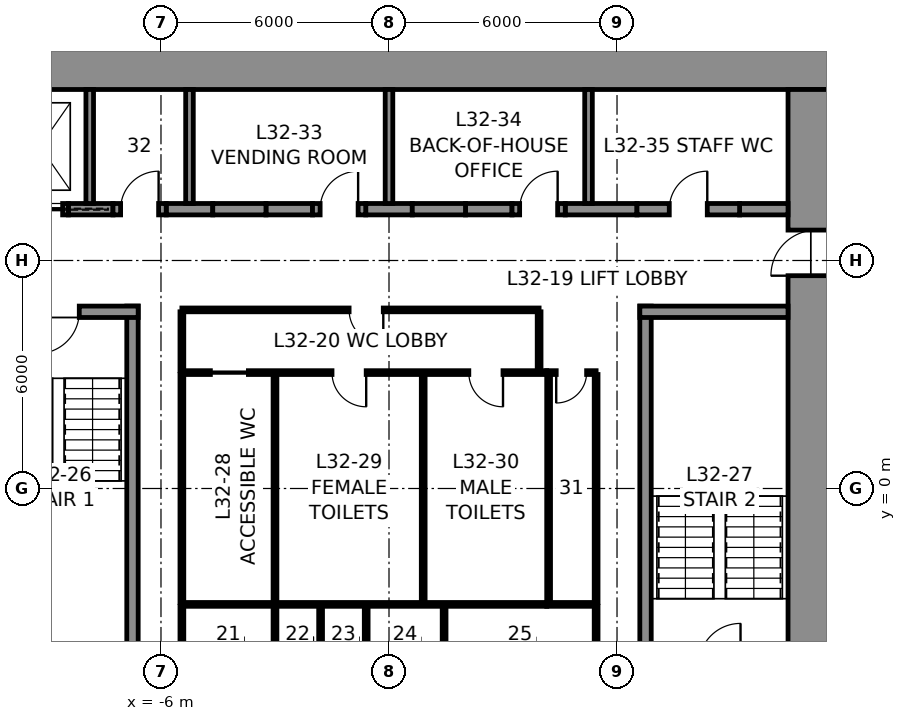
"""IFC4 building model, lengths in metres.
Left out: names, types, materials, properties, quantities, classifications, styles, units other than length and angle.
Written with IfcOpenShell. Run it as: python <this file> out.ifc"""

import sys

from ifc_helpers import new_model, si_unit, direction, frame, frame_2d, origin, place, context, subcontext, project, spatial, rectangle, extrude, element, fill, save


model = new_model("IFC4")
c1 = context("Model", 3, precision=1e-05, world=origin(), true_north=direction((0.0, 1.0)))
c2 = subcontext(c1, "Body", "Model", "MODEL_VIEW")
j1 = project(units=[si_unit("LENGTHUNIT", "METRE"), si_unit("PLANEANGLEUNIT", "RADIAN")], contexts=[c1])
p1 = place(None, origin())
s1 = spatial("IfcSite", under=j1, at=p1, CompositionType="ELEMENT")
p2 = place(p1, origin())
s2 = spatial("IfcBuilding", under=s1, at=p2, CompositionType="ELEMENT")
p3 = place(p2, frame((0.0, 0.0, 155.8)))
s3 = spatial("IfcBuildingStorey", under=s2, at=p3, CompositionType="ELEMENT", Elevation=155.8)
p4 = place(p3, frame((-12.0, 11.25, 0.0), z_axis=(0.0, 0.0, 1.0), x_axis=(1.0, 0.0, 0.0)))
e1 = element("IfcWall", 1, at=p4, inside=s3, PredefinedType="SHEAR", context=c2, shape_type="SweptSolid", body=[
    extrude(rectangle(XDim=24.0, YDim=1.5, at=frame_2d((12.0, 0.0))), origin(), (0.0, 0.0, 1.0), 4.0),
])
p5 = place(p3, frame((11.25, 10.5, 0.0), z_axis=(0.0, 0.0, 1.0), x_axis=(0.0, -1.0, 0.0)))
e2 = element("IfcWall", 2, at=p5, inside=s3, PredefinedType="SHEAR", context=c2, shape_type="SweptSolid", body=[
    extrude(rectangle(XDim=21.0, YDim=1.5, at=frame_2d((10.5, 0.0))), origin(), (0.0, 0.0, 1.0), 4.0),
])
p6 = place(p5, frame((3.7, 0.0, 0.0)))
e3 = element("IfcOpeningElement", 3, at=p6, cuts=e2, PredefinedType="OPENING", context=c2, shape_type="SweptSolid", body=[
    extrude(rectangle(XDim=1.2, YDim=2.3, at=frame_2d((0.6, 1.15))), frame((0.0, 0.76, 0.0), z_axis=(0.0, -1.0, 0.0), x_axis=(1.0, 0.0, 0.0)), (0.0, 0.0, 1.0), 1.52),
])
p7 = place(p5, frame((16.1, 0.0, 0.0)))
e4 = element("IfcOpeningElement", 4, at=p7, cuts=e2, PredefinedType="OPENING", context=c2, shape_type="SweptSolid", body=[
    extrude(rectangle(XDim=1.2, YDim=2.3, at=frame_2d((0.6, 1.15))), frame((0.0, 0.76, 0.0), z_axis=(0.0, -1.0, 0.0), x_axis=(1.0, 0.0, 0.0)), (0.0, 0.0, 1.0), 1.52),
])
p8 = place(p3, frame((-8.438, 7.35, 0.0), z_axis=(0.0, 0.0, 1.0), x_axis=(1.0, 0.0, 0.0)))
e5 = element("IfcWall", 5, at=p8, inside=s3, PredefinedType="SHEAR", context=c2, shape_type="SweptSolid", body=[
    extrude(rectangle(XDim=1.175, YDim=0.3, at=frame_2d((0.587, 0.0))), origin(), (0.0, 0.0, 1.0), 4.0),
])
for number, where, z_axis, x_axis in (
    (6, (-5.863, 7.35, 0.0), (0.0, 0.0, 1.0), (1.0, 0.0, 0.0)),
    (7, (-3.238, 7.35, 0.0), (0.0, 0.0, 1.0), (1.0, 0.0, 0.0)),
    (8, (-0.613, 7.35, 0.0), (0.0, 0.0, 1.0), (1.0, 0.0, 0.0)),
    (9, (2.012, 7.35, 0.0), (0.0, 0.0, 1.0), (1.0, 0.0, 0.0)),
):
    element("IfcWall", number, at=place(p3, frame(where, z_axis=z_axis, x_axis=x_axis)), inside=s3, PredefinedType="SHEAR", context=c2, shape_type="SweptSolid", body=[
        extrude(rectangle(XDim=1.225, YDim=0.3, at=frame_2d((0.613, 0.0))), origin(), (0.0, 0.0, 1.0), 4.0),
    ])
p9 = place(p3, frame((4.637, 7.35, 0.0), z_axis=(0.0, 0.0, 1.0), x_axis=(1.0, 0.0, 0.0)))
e10 = element("IfcWall", 10, at=p9, inside=s3, PredefinedType="SHEAR", context=c2, shape_type="SweptSolid", body=[
    extrude(rectangle(XDim=1.887, YDim=0.3, at=frame_2d((0.944, 0.0))), origin(), (0.0, 0.0, 1.0), 4.0),
])
p10 = place(p3, frame((9.225, 7.35, 0.0), z_axis=(0.0, 0.0, 1.0), x_axis=(1.0, 0.0, 0.0)))
e11 = element("IfcWall", 11, at=p10, inside=s3, PredefinedType="SHEAR", context=c2, shape_type="SweptSolid", body=[
    extrude(rectangle(XDim=1.275, YDim=0.3, at=frame_2d((0.637, 0.0))), origin(), (0.0, 0.0, 1.0), 4.0),
])
p11 = place(p3, frame((-9.938, 7.35, 0.0), z_axis=(0.0, 0.0, 1.0), x_axis=(1.0, 0.0, 0.0)))
e12 = element("IfcWall", 12, at=p11, inside=s3, PredefinedType="PARTITIONING", context=c2, shape_type="SweptSolid", body=[
    extrude(rectangle(XDim=1.5, YDim=0.3, at=frame_2d((0.75, 0.0))), origin(), (0.0, 0.0, 1.0), 4.0),
])
p12 = place(p11, frame((0.15, 0.0, 0.0)))
e13 = element("IfcOpeningElement", 13, at=p12, cuts=e12, PredefinedType="OPENING", context=c2, shape_type="SweptSolid", body=[
    extrude(rectangle(XDim=1.2, YDim=2.3, at=frame_2d((0.6, 1.15))), frame((0.0, 0.16, 0.0), z_axis=(0.0, -1.0, 0.0), x_axis=(1.0, 0.0, 0.0)), (0.0, 0.0, 1.0), 0.32),
])
p13 = place(p3, frame((-7.262, 7.35, 0.0), z_axis=(0.0, 0.0, 1.0), x_axis=(1.0, 0.0, 0.0)))
e14 = element("IfcWall", 14, at=p13, inside=s3, PredefinedType="PARTITIONING", context=c2, shape_type="SweptSolid", body=[
    extrude(rectangle(XDim=1.4, YDim=0.3, at=frame_2d((0.7, 0.0))), origin(), (0.0, 0.0, 1.0), 4.0),
])
p14 = place(p13, frame((0.2, 0.0, 0.0)))
e15 = element("IfcOpeningElement", 15, at=p14, cuts=e14, PredefinedType="OPENING", context=c2, shape_type="SweptSolid", body=[
    extrude(rectangle(XDim=1.0, YDim=2.3, at=frame_2d((0.5, 1.15))), frame((0.0, 0.16, 0.0), z_axis=(0.0, -1.0, 0.0), x_axis=(1.0, 0.0, 0.0)), (0.0, 0.0, 1.0), 0.32),
])
p15 = place(p3, frame((-4.637, 7.35, 0.0), z_axis=(0.0, 0.0, 1.0), x_axis=(1.0, 0.0, 0.0)))
e16 = element("IfcWall", 16, at=p15, inside=s3, PredefinedType="PARTITIONING", context=c2, shape_type="SweptSolid", body=[
    extrude(rectangle(XDim=1.4, YDim=0.3, at=frame_2d((0.7, 0.0))), origin(), (0.0, 0.0, 1.0), 4.0),
])
p16 = place(p3, frame((-2.012, 7.35, 0.0), z_axis=(0.0, 0.0, 1.0), x_axis=(1.0, 0.0, 0.0)))
e17 = element("IfcWall", 17, at=p16, inside=s3, PredefinedType="PARTITIONING", context=c2, shape_type="SweptSolid", body=[
    extrude(rectangle(XDim=1.4, YDim=0.3, at=frame_2d((0.7, 0.0))), origin(), (0.0, 0.0, 1.0), 4.0),
])
p17 = place(p16, frame((0.2, 0.0, 0.0)))
e18 = element("IfcOpeningElement", 18, at=p17, cuts=e17, PredefinedType="OPENING", context=c2, shape_type="SweptSolid", body=[
    extrude(rectangle(XDim=1.0, YDim=2.3, at=frame_2d((0.5, 1.15))), frame((0.0, 0.16, 0.0), z_axis=(0.0, -1.0, 0.0), x_axis=(1.0, 0.0, 0.0)), (0.0, 0.0, 1.0), 0.32),
])
p18 = place(p3, frame((0.613, 7.35, 0.0), z_axis=(0.0, 0.0, 1.0), x_axis=(1.0, 0.0, 0.0)))
e19 = element("IfcWall", 19, at=p18, inside=s3, PredefinedType="PARTITIONING", context=c2, shape_type="SweptSolid", body=[
    extrude(rectangle(XDim=1.4, YDim=0.3, at=frame_2d((0.7, 0.0))), origin(), (0.0, 0.0, 1.0), 4.0),
])
p19 = place(p3, frame((3.238, 7.35, 0.0), z_axis=(0.0, 0.0, 1.0), x_axis=(1.0, 0.0, 0.0)))
e20 = element("IfcWall", 20, at=p19, inside=s3, PredefinedType="PARTITIONING", context=c2, shape_type="SweptSolid", body=[
    extrude(rectangle(XDim=1.4, YDim=0.3, at=frame_2d((0.7, 0.0))), origin(), (0.0, 0.0, 1.0), 4.0),
])
p20 = place(p19, frame((0.2, 0.0, 0.0)))
e21 = element("IfcOpeningElement", 21, at=p20, cuts=e20, PredefinedType="OPENING", context=c2, shape_type="SweptSolid", body=[
    extrude(rectangle(XDim=1.0, YDim=2.3, at=frame_2d((0.5, 1.15))), frame((0.0, 0.16, 0.0), z_axis=(0.0, -1.0, 0.0), x_axis=(1.0, 0.0, 0.0)), (0.0, 0.0, 1.0), 0.32),
])
p21 = place(p3, frame((6.525, 7.35, 0.0), z_axis=(0.0, 0.0, 1.0), x_axis=(1.0, 0.0, 0.0)))
e22 = element("IfcWall", 22, at=p21, inside=s3, PredefinedType="PARTITIONING", context=c2, shape_type="SweptSolid", body=[
    extrude(rectangle(XDim=2.7, YDim=0.3, at=frame_2d((1.35, 0.0))), origin(), (0.0, 0.0, 1.0), 4.0),
])
p22 = place(p21, frame((0.85, 0.0, 0.0)))
e23 = element("IfcOpeningElement", 23, at=p22, cuts=e22, PredefinedType="OPENING", context=c2, shape_type="SweptSolid", body=[
    extrude(rectangle(XDim=1.0, YDim=2.3, at=frame_2d((0.5, 1.15))), frame((0.0, 0.16, 0.0), z_axis=(0.0, -1.0, 0.0), x_axis=(1.0, 0.0, 0.0)), (0.0, 0.0, 1.0), 0.32),
])
for number, where, z_axis, x_axis in (
    (24, (-7.875, 7.5, 0.0), (0.0, 0.0, 1.0), (0.0, 1.0, 0.0)),
    (25, (-5.25, 7.5, 0.0), (0.0, 0.0, 1.0), (0.0, 1.0, 0.0)),
    (26, (0.0, 7.5, 0.0), (0.0, 0.0, 1.0), (0.0, 1.0, 0.0)),
    (27, (5.25, 7.5, 0.0), (0.0, 0.0, 1.0), (0.0, 1.0, 0.0)),
):
    element("IfcWall", number, at=place(p3, frame(where, z_axis=z_axis, x_axis=x_axis)), inside=s3, PredefinedType="PARTITIONING", context=c2, shape_type="SweptSolid", body=[
        extrude(rectangle(XDim=3.0, YDim=0.2, at=frame_2d((1.5, 0.0))), origin(), (0.0, 0.0, 1.0), 4.0),
    ])
p23 = place(p3, frame((-6.75, -4.8, 0.0), z_axis=(0.0, 0.0, 1.0), x_axis=(0.0, 1.0, 0.0)))
e28 = element("IfcWall", 28, at=p23, inside=s3, PredefinedType="SOLIDWALL", context=c2, shape_type="SweptSolid", body=[
    extrude(rectangle(XDim=9.6, YDim=0.3, at=frame_2d((4.8, 0.0))), origin(), (0.0, 0.0, 1.0), 3.75),
])
p24 = place(p3, frame((-10.5, 4.65, 0.0), z_axis=(0.0, 0.0, 1.0), x_axis=(1.0, 0.0, 0.0)))
e29 = element("IfcWall", 29, at=p24, inside=s3, PredefinedType="SOLIDWALL", context=c2, shape_type="SweptSolid", body=[
    extrude(rectangle(XDim=3.9, YDim=0.3, at=frame_2d((1.95, 0.0))), origin(), (0.0, 0.0, 1.0), 3.75),
])
p25 = place(p24, frame((1.25, 0.0, 0.0)))
e30 = element("IfcOpeningElement", 30, at=p25, cuts=e29, PredefinedType="OPENING", context=c2, shape_type="SweptSolid", body=[
    extrude(rectangle(XDim=1.1, YDim=2.3, at=frame_2d((0.55, 1.15))), frame((0.0, 0.16, 0.0), z_axis=(0.0, -1.0, 0.0), x_axis=(1.0, 0.0, 0.0)), (0.0, 0.0, 1.0), 0.32),
])
p26 = place(p3, frame((6.75, -4.8, 0.0), z_axis=(0.0, 0.0, 1.0), x_axis=(0.0, 1.0, 0.0)))
e31 = element("IfcWall", 31, at=p26, inside=s3, PredefinedType="SOLIDWALL", context=c2, shape_type="SweptSolid", body=[
    extrude(rectangle(XDim=9.6, YDim=0.3, at=frame_2d((4.8, 0.0))), origin(), (0.0, 0.0, 1.0), 3.75),
])
p27 = place(p3, frame((6.6, 4.65, 0.0), z_axis=(0.0, 0.0, 1.0), x_axis=(1.0, 0.0, 0.0)))
e32 = element("IfcWall", 32, at=p27, inside=s3, PredefinedType="SOLIDWALL", context=c2, shape_type="SweptSolid", body=[
    extrude(rectangle(XDim=3.9, YDim=0.3, at=frame_2d((1.95, 0.0))), origin(), (0.0, 0.0, 1.0), 3.75),
])
p28 = place(p3, frame((-5.45, 3.05, 0.0), z_axis=(0.0, 0.0, 1.0), x_axis=(1.0, 0.0, 0.0)))
e33 = element("IfcWall", 33, at=p28, inside=s3, PredefinedType="PARTITIONING", context=c2, shape_type="SweptSolid", body=[
    extrude(rectangle(XDim=9.6, YDim=0.1, at=frame_2d((4.8, 0.0))), origin(), (0.0, 0.0, 1.0), 3.75),
])
p29 = place(p28, frame((0.75, 0.0, 0.0)))
e34 = element("IfcOpeningElement", 34, at=p29, cuts=e33, PredefinedType="OPENING", context=c2, shape_type="SweptSolid", body=[
    extrude(rectangle(XDim=1.0, YDim=2.3, at=frame_2d((0.5, 1.15))), frame((0.0, 0.06, 0.0), z_axis=(0.0, -1.0, 0.0), x_axis=(1.0, 0.0, 0.0)), (0.0, 0.0, 1.0), 0.12),
])
p30 = place(p28, frame((3.95, 0.0, 0.0)))
e35 = element("IfcOpeningElement", 35, at=p30, cuts=e33, PredefinedType="OPENING", context=c2, shape_type="SweptSolid", body=[
    extrude(rectangle(XDim=0.9, YDim=2.3, at=frame_2d((0.45, 1.15))), frame((0.0, 0.06, 0.0), z_axis=(0.0, -1.0, 0.0), x_axis=(1.0, 0.0, 0.0)), (0.0, 0.0, 1.0), 0.12),
])
p31 = place(p28, frame((7.55, 0.0, 0.0)))
e36 = element("IfcOpeningElement", 36, at=p31, cuts=e33, PredefinedType="OPENING", context=c2, shape_type="SweptSolid", body=[
    extrude(rectangle(XDim=0.9, YDim=2.3, at=frame_2d((0.45, 1.15))), frame((0.0, 0.06, 0.0), z_axis=(0.0, -1.0, 0.0), x_axis=(1.0, 0.0, 0.0)), (0.0, 0.0, 1.0), 0.12),
])
p32 = place(p3, frame((4.15, 3.05, 0.0), z_axis=(0.0, 0.0, 1.0), x_axis=(1.0, 0.0, 0.0)))
e37 = element("IfcWall", 37, at=p32, inside=s3, PredefinedType="PARTITIONING", context=c2, shape_type="SweptSolid", body=[
    extrude(rectangle(XDim=1.3, YDim=0.1, at=frame_2d((0.65, 0.0))), origin(), (0.0, 0.0, 1.0), 3.75),
])
p33 = place(p32, frame((0.25, 0.0, 0.0)))
e38 = element("IfcOpeningElement", 38, at=p33, cuts=e37, PredefinedType="OPENING", context=c2, shape_type="SweptSolid", body=[
    extrude(rectangle(XDim=0.8, YDim=2.3, at=frame_2d((0.4, 1.15))), frame((0.0, 0.06, 0.0), z_axis=(0.0, -1.0, 0.0), x_axis=(1.0, 0.0, 0.0)), (0.0, 0.0, 1.0), 0.12),
])
p34 = place(p3, frame((4.15, -3.05, 0.0), z_axis=(0.0, 0.0, 1.0), x_axis=(-1.0, 0.0, 0.0)))
e39 = element("IfcWall", 39, at=p34, inside=s3, PredefinedType="PARTITIONING", context=c2, shape_type="SweptSolid", body=[
    extrude(rectangle(XDim=9.6, YDim=0.1, at=frame_2d((4.8, 0.0))), origin(), (0.0, 0.0, 1.0), 3.75),
])
p35 = place(p3, frame((5.45, -3.05, 0.0), z_axis=(0.0, 0.0, 1.0), x_axis=(-1.0, 0.0, 0.0)))
e40 = element("IfcWall", 40, at=p35, inside=s3, PredefinedType="PARTITIONING", context=c2, shape_type="SweptSolid", body=[
    extrude(rectangle(XDim=1.3, YDim=0.1, at=frame_2d((0.65, 0.0))), origin(), (0.0, 0.0, 1.0), 3.75),
])
for number, where, z_axis, x_axis in (
    (41, (5.45, 3.0, 0.0), (0.0, 0.0, 1.0), (0.0, -1.0, 0.0)),
    (42, (-5.45, -3.0, 0.0), (0.0, 0.0, 1.0), (0.0, 1.0, 0.0)),
    (43, (-3.0, -3.0, 0.0), (0.0, 0.0, 1.0), (0.0, 1.0, 0.0)),
    (44, (0.9, -3.0, 0.0), (0.0, 0.0, 1.0), (0.0, 1.0, 0.0)),
    (45, (4.2, -3.0, 0.0), (0.0, 0.0, 1.0), (0.0, 1.0, 0.0)),
):
    element("IfcWall", number, at=place(p3, frame(where, z_axis=z_axis, x_axis=x_axis)), inside=s3, PredefinedType="PARTITIONING", context=c2, shape_type="SweptSolid", body=[
        extrude(rectangle(XDim=6.0, YDim=0.1, at=frame_2d((3.0, 0.0))), origin(), (0.0, 0.0, 1.0), 3.75),
    ])
p36 = place(p3, frame((-5.45, 4.7, 0.0), z_axis=(0.0, 0.0, 1.0), x_axis=(1.0, 0.0, 0.0)))
e46 = element("IfcWall", 46, at=p36, inside=s3, PredefinedType="PARTITIONING", context=c2, shape_type="SweptSolid", body=[
    extrude(rectangle(XDim=9.4, YDim=0.1, at=frame_2d((4.7, 0.0))), origin(), (0.0, 0.0, 1.0), 3.75),
])
p37 = place(p36, frame((4.4, 0.0, 0.0)))
e47 = element("IfcOpeningElement", 47, at=p37, cuts=e46, PredefinedType="OPENING", context=c2, shape_type="SweptSolid", body=[
    extrude(rectangle(XDim=0.9, YDim=2.3, at=frame_2d((0.45, 1.15))), frame((0.0, 0.06, 0.0), z_axis=(0.0, -1.0, 0.0), x_axis=(1.0, 0.0, 0.0)), (0.0, 0.0, 1.0), 0.12),
])
for number, where, z_axis, x_axis in (
    (48, (-5.45, 3.1, 0.0), (0.0, 0.0, 1.0), (0.0, 1.0, 0.0)),
    (49, (3.95, 3.1, 0.0), (0.0, 0.0, 1.0), (0.0, 1.0, 0.0)),
    (50, (-5.45, -3.1, 0.0), (0.0, 0.0, 1.0), (0.0, -1.0, 0.0)),
    (51, (5.45, -3.1, 0.0), (0.0, 0.0, 1.0), (0.0, -1.0, 0.0)),
    (52, (-3.0, -3.1, 0.0), (0.0, 0.0, 1.0), (0.0, -1.0, 0.0)),
    (53, (-1.8, -3.1, 0.0), (0.0, 0.0, 1.0), (0.0, -1.0, 0.0)),
    (54, (-0.6, -3.1, 0.0), (0.0, 0.0, 1.0), (0.0, -1.0, 0.0)),
    (55, (1.45, -3.1, 0.0), (0.0, 0.0, 1.0), (0.0, -1.0, 0.0)),
):
    element("IfcWall", number, at=place(p3, frame(where, z_axis=z_axis, x_axis=x_axis)), inside=s3, PredefinedType="PARTITIONING", context=c2, shape_type="SweptSolid", body=[
        extrude(rectangle(XDim=1.55, YDim=0.1, at=frame_2d((0.775, 0.0))), origin(), (0.0, 0.0, 1.0), 3.75),
    ])
p38 = place(p25, frame((1.1, 0.0, 0.0), z_axis=(0.0, 0.0, 1.0), x_axis=(-1.0, 0.0, 0.0)))
e56 = element("IfcDoor", 56, at=p38, inside=s3, OperationType="SINGLE_SWING_RIGHT", PredefinedType="DOOR", context=c2, shape_type="SweptSolid", body=[
    extrude(rectangle(XDim=1.1, YDim=2.3, at=frame_2d((0.55, 1.15))), frame((0.0, 0.025, 0.0), z_axis=(0.0, -1.0, 0.0), x_axis=(1.0, 0.0, 0.0)), (0.0, 0.0, 1.0), 0.05),
])
fill(e30, e56)
p39 = place(p29, frame((1.0, 0.0, 0.0), z_axis=(0.0, 0.0, 1.0), x_axis=(-1.0, 0.0, 0.0)))
e57 = element("IfcDoor", 57, at=p39, inside=s3, OperationType="SLIDING_TO_LEFT", PredefinedType="DOOR", context=c2, shape_type="SweptSolid", body=[
    extrude(rectangle(XDim=1.0, YDim=2.3, at=frame_2d((0.5, 1.15))), frame((0.0, 0.025, 0.0), z_axis=(0.0, -1.0, 0.0), x_axis=(1.0, 0.0, 0.0)), (0.0, 0.0, 1.0), 0.05),
])
fill(e34, e57)
p40 = place(p30, frame((0.9, 0.0, 0.0), z_axis=(0.0, 0.0, 1.0), x_axis=(-1.0, 0.0, 0.0)))
e58 = element("IfcDoor", 58, at=p40, inside=s3, OperationType="SINGLE_SWING_LEFT", PredefinedType="DOOR", context=c2, shape_type="SweptSolid", body=[
    extrude(rectangle(XDim=0.9, YDim=2.3, at=frame_2d((0.45, 1.15))), frame((0.0, 0.025, 0.0), z_axis=(0.0, -1.0, 0.0), x_axis=(1.0, 0.0, 0.0)), (0.0, 0.0, 1.0), 0.05),
])
fill(e35, e58)
p41 = place(p31, frame((0.9, 0.0, 0.0), z_axis=(0.0, 0.0, 1.0), x_axis=(-1.0, 0.0, 0.0)))
e59 = element("IfcDoor", 59, at=p41, inside=s3, OperationType="SINGLE_SWING_LEFT", PredefinedType="DOOR", context=c2, shape_type="SweptSolid", body=[
    extrude(rectangle(XDim=0.9, YDim=2.3, at=frame_2d((0.45, 1.15))), frame((0.0, 0.025, 0.0), z_axis=(0.0, -1.0, 0.0), x_axis=(1.0, 0.0, 0.0)), (0.0, 0.0, 1.0), 0.05),
])
fill(e36, e59)
p42 = place(p33, frame((0.8, 0.0, 0.0), z_axis=(0.0, 0.0, 1.0), x_axis=(-1.0, 0.0, 0.0)))
e60 = element("IfcDoor", 60, at=p42, inside=s3, OperationType="SINGLE_SWING_RIGHT", PredefinedType="DOOR", context=c2, shape_type="SweptSolid", body=[
    extrude(rectangle(XDim=0.8, YDim=2.3, at=frame_2d((0.4, 1.15))), frame((0.0, 0.025, 0.0), z_axis=(0.0, -1.0, 0.0), x_axis=(1.0, 0.0, 0.0)), (0.0, 0.0, 1.0), 0.05),
])
fill(e38, e60)
p43 = place(p37, frame((0.9, 0.0, 0.0), z_axis=(0.0, 0.0, 1.0), x_axis=(-1.0, 0.0, 0.0)))
e61 = element("IfcDoor", 61, at=p43, inside=s3, OperationType="SINGLE_SWING_LEFT", PredefinedType="DOOR", context=c2, shape_type="SweptSolid", body=[
    extrude(rectangle(XDim=0.9, YDim=2.3, at=frame_2d((0.45, 1.15))), frame((0.0, 0.025, 0.0), z_axis=(0.0, -1.0, 0.0), x_axis=(1.0, 0.0, 0.0)), (0.0, 0.0, 1.0), 0.05),
])
fill(e47, e61)
p44 = place(p14, origin())
e62 = element("IfcDoor", 62, at=p44, inside=s3, OperationType="SINGLE_SWING_RIGHT", PredefinedType="DOOR", context=c2, shape_type="SweptSolid", body=[
    extrude(rectangle(XDim=1.0, YDim=2.3, at=frame_2d((0.5, 1.15))), frame((0.0, 0.025, 0.0), z_axis=(0.0, -1.0, 0.0), x_axis=(1.0, 0.0, 0.0)), (0.0, 0.0, 1.0), 0.05),
])
fill(e15, e62)
p45 = place(p17, origin())
e63 = element("IfcDoor", 63, at=p45, inside=s3, OperationType="SINGLE_SWING_RIGHT", PredefinedType="DOOR", context=c2, shape_type="SweptSolid", body=[
    extrude(rectangle(XDim=1.0, YDim=2.3, at=frame_2d((0.5, 1.15))), frame((0.0, 0.025, 0.0), z_axis=(0.0, -1.0, 0.0), x_axis=(1.0, 0.0, 0.0)), (0.0, 0.0, 1.0), 0.05),
])
fill(e18, e63)
p46 = place(p20, origin())
e64 = element("IfcDoor", 64, at=p46, inside=s3, OperationType="SINGLE_SWING_RIGHT", PredefinedType="DOOR", context=c2, shape_type="SweptSolid", body=[
    extrude(rectangle(XDim=1.0, YDim=2.3, at=frame_2d((0.5, 1.15))), frame((0.0, 0.025, 0.0), z_axis=(0.0, -1.0, 0.0), x_axis=(1.0, 0.0, 0.0)), (0.0, 0.0, 1.0), 0.05),
])
fill(e21, e64)
p47 = place(p22, origin())
e65 = element("IfcDoor", 65, at=p47, inside=s3, OperationType="SINGLE_SWING_RIGHT", PredefinedType="DOOR", context=c2, shape_type="SweptSolid", body=[
    extrude(rectangle(XDim=1.0, YDim=2.3, at=frame_2d((0.5, 1.15))), frame((0.0, 0.025, 0.0), z_axis=(0.0, -1.0, 0.0), x_axis=(1.0, 0.0, 0.0)), (0.0, 0.0, 1.0), 0.05),
])
fill(e23, e65)
p48 = place(p6, frame((1.2, 0.0, 0.0), z_axis=(0.0, 0.0, 1.0), x_axis=(-1.0, 0.0, 0.0)))
e66 = element("IfcDoor", 66, at=p48, inside=s3, OperationType="SINGLE_SWING_LEFT", PredefinedType="DOOR", context=c2, shape_type="SweptSolid", body=[
    extrude(rectangle(XDim=1.2, YDim=2.3, at=frame_2d((0.6, 1.15))), frame((0.0, 0.025, 0.0), z_axis=(0.0, -1.0, 0.0), x_axis=(1.0, 0.0, 0.0)), (0.0, 0.0, 1.0), 0.05),
])
fill(e3, e66)
p49 = place(p12, frame((1.2, 0.0, 0.0), z_axis=(0.0, 0.0, 1.0), x_axis=(-1.0, 0.0, 0.0)))
e67 = element("IfcDoor", 67, at=p49, inside=s3, OperationType="SLIDING_TO_LEFT", PredefinedType="DOOR", context=c2, shape_type="SweptSolid", body=[
    extrude(rectangle(XDim=1.2, YDim=2.3, at=frame_2d((0.6, 1.15))), frame((0.0, 0.025, 0.0), z_axis=(0.0, -1.0, 0.0), x_axis=(1.0, 0.0, 0.0)), (0.0, 0.0, 1.0), 0.05),
])
fill(e13, e67)
save(model, sys.argv[1])
